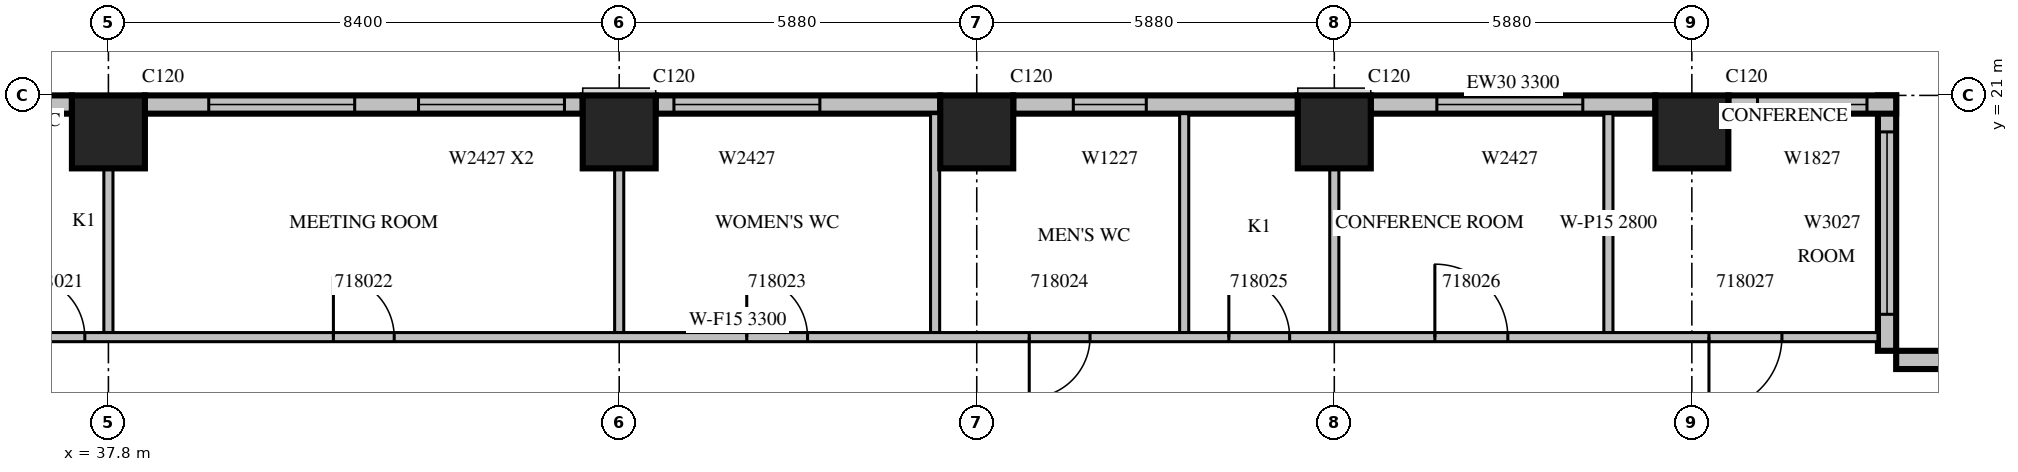
"""IFC4 building model, lengths in metres.
Left out: names, types, materials, properties, quantities, classifications, styles, units other than length and angle.
Written with IfcOpenShell. Run it as: python <this file> out.ifc"""

import sys

from ifc_helpers import new_model, si_unit, direction, frame, frame_2d, origin, origin_2d, place, context, subcontext, project, spatial, rectangle, extrude, source, transform, mapped, element, fill, save


model = new_model("IFC4")
c1 = context("Model", 3, precision=1e-05, world=origin(), true_north=direction((0.0, 1.0)))
c2 = subcontext(c1, "Body", "Model", "MODEL_VIEW")
j1 = project(units=[si_unit("LENGTHUNIT", "METRE"), si_unit("PLANEANGLEUNIT", "RADIAN")], contexts=[c1])
p1 = place(None, origin())
s1 = spatial("IfcSite", under=j1, at=p1, CompositionType="ELEMENT")
p2 = place(p1, origin())
s2 = spatial("IfcBuilding", under=s1, at=p2, CompositionType="ELEMENT")
p3 = place(p2, frame((0.0, 0.0, 86.7)))
s3 = spatial("IfcBuildingStorey", under=s2, at=p3, CompositionType="ELEMENT", Elevation=86.7)
m1 = source(origin(), c2, "Body", "SweptSolid", [
    extrude(rectangle(XDim=1.2, YDim=1.2, at=origin_2d()), origin(), (0.0, 0.0, 1.0), 4.2),
])
for number, where, z_axis, x_axis in (
    (1, (37.8, 20.4, 0.0), (0.0, 0.0, 1.0), (1.0, 0.0, 0.0)),
    (2, (46.2, 20.4, 0.0), (0.0, 0.0, 1.0), (1.0, 0.0, 0.0)),
    (3, (52.08, 20.4, 0.0), (0.0, 0.0, 1.0), (1.0, 0.0, 0.0)),
    (4, (57.96, 20.4, 0.0), (0.0, 0.0, 1.0), (1.0, 0.0, 0.0)),
    (5, (63.84, 20.4, 0.0), (0.0, 0.0, 1.0), (1.0, 0.0, 0.0)),
):
    element("IfcColumn", number, at=place(p3, frame(where, z_axis=z_axis, x_axis=x_axis)), inside=s3, PredefinedType="COLUMN", context=c2, shape_type="MappedRepresentation", body=[
        mapped(m1, transform((0.0, 0.0, 0.0), scale=1.0)),
    ])
m2 = source(origin(), c2, "Body", "SweptSolid", [
    extrude(rectangle(XDim=4.2, YDim=0.3, at=frame_2d((2.1, 0.0))), origin(), (0.0, 0.0, 1.0), 3.8),
])
p4 = place(p3, frame((71.4, 16.65, 0.0), z_axis=(0.0, 0.0, 1.0), x_axis=(-1.0, 0.0, 0.0)))
e6 = element("IfcWall", 6, at=p4, inside=s3, PredefinedType="STANDARD", context=c2, shape_type="MappedRepresentation", body=[
    mapped(m2, transform((0.0, 0.0, 0.0), scale=1.0)),
])
m3 = source(origin(), c2, "Body", "SweptSolid", [
    extrude(rectangle(XDim=1.2, YDim=2.7, at=frame_2d((0.6, 1.35))), frame((0.0, 0.16, 0.0), z_axis=(0.0, -1.0, 0.0), x_axis=(1.0, 0.0, 0.0)), (0.0, 0.0, 1.0), 0.32),
])
p5 = place(p4, frame((0.66, 0.0, 0.6)))
e7 = element("IfcOpeningElement", 7, at=p5, cuts=e6, PredefinedType="OPENING", context=c2, shape_type="MappedRepresentation", body=[
    mapped(m3, transform((0.0, 0.0, 0.0), scale=1.0)),
])
p6 = place(p3, frame((67.05, 16.8, 0.0), z_axis=(0.0, 0.0, 1.0), x_axis=(0.0, 1.0, 0.0)))
e8 = element("IfcWall", 8, at=p6, inside=s3, PredefinedType="STANDARD", context=c2, shape_type="MappedRepresentation", body=[
    mapped(m2, transform((0.0, 0.0, 0.0), scale=1.0)),
])
m4 = source(origin(), c2, "Body", "SweptSolid", [
    extrude(rectangle(XDim=3.0, YDim=2.7, at=frame_2d((1.5, 1.35))), frame((0.0, 0.16, 0.0), z_axis=(0.0, -1.0, 0.0), x_axis=(1.0, 0.0, 0.0)), (0.0, 0.0, 1.0), 0.32),
])
p7 = place(p6, frame((0.6, 0.0, 0.6)))
e9 = element("IfcOpeningElement", 9, at=p7, cuts=e8, PredefinedType="OPENING", context=c2, shape_type="MappedRepresentation", body=[
    mapped(m4, transform((0.0, 0.0, 0.0), scale=1.0)),
])
m5 = source(origin(), c2, "Body", "SweptSolid", [
    extrude(rectangle(XDim=2.76, YDim=0.3, at=frame_2d((1.38, 0.0))), origin(), (0.0, 0.0, 1.0), 3.8),
])
p8 = place(p3, frame((67.2, 20.85, 0.0), z_axis=(0.0, 0.0, 1.0), x_axis=(-1.0, 0.0, 0.0)))
e10 = element("IfcWall", 10, at=p8, inside=s3, PredefinedType="STANDARD", context=c2, shape_type="MappedRepresentation", body=[
    mapped(m5, transform((0.0, 0.0, 0.0), scale=1.0)),
])
m6 = source(origin(), c2, "Body", "SweptSolid", [
    extrude(rectangle(XDim=1.8, YDim=2.7, at=frame_2d((0.9, 1.35))), frame((0.0, 0.16, 0.0), z_axis=(0.0, -1.0, 0.0), x_axis=(1.0, 0.0, 0.0)), (0.0, 0.0, 1.0), 0.32),
])
p9 = place(p8, frame((0.48, 0.0, 0.6)))
e11 = element("IfcOpeningElement", 11, at=p9, cuts=e10, PredefinedType="OPENING", context=c2, shape_type="MappedRepresentation", body=[
    mapped(m6, transform((0.0, 0.0, 0.0), scale=1.0)),
])
m7 = source(origin(), c2, "Body", "SweptSolid", [
    extrude(rectangle(XDim=4.68, YDim=0.3, at=frame_2d((2.34, 0.0))), origin(), (0.0, 0.0, 1.0), 3.3),
])
p10 = place(p3, frame((63.24, 20.85, 0.0), z_axis=(0.0, 0.0, 1.0), x_axis=(-1.0, 0.0, 0.0)))
e12 = element("IfcWall", 12, at=p10, inside=s3, PredefinedType="STANDARD", context=c2, shape_type="MappedRepresentation", body=[
    mapped(m7, transform((0.0, 0.0, 0.0), scale=1.0)),
])
m8 = source(origin(), c2, "Body", "SweptSolid", [
    extrude(rectangle(XDim=2.4, YDim=2.7, at=frame_2d((1.2, 1.35))), frame((0.0, 0.16, 0.0), z_axis=(0.0, -1.0, 0.0), x_axis=(1.0, 0.0, 0.0)), (0.0, 0.0, 1.0), 0.32),
])
p11 = place(p10, frame((1.194, 0.0, 0.6)))
e13 = element("IfcOpeningElement", 13, at=p11, cuts=e12, PredefinedType="OPENING", context=c2, shape_type="MappedRepresentation", body=[
    mapped(m8, transform((0.0, 0.0, 0.0), scale=1.0)),
])
m9 = source(origin(), c2, "Body", "SweptSolid", [
    extrude(rectangle(XDim=4.68, YDim=0.3, at=frame_2d((2.34, 0.0))), origin(), (0.0, 0.0, 1.0), 3.8),
])
p12 = place(p3, frame((57.36, 20.85, 0.0), z_axis=(0.0, 0.0, 1.0), x_axis=(-1.0, 0.0, 0.0)))
e14 = element("IfcWall", 14, at=p12, inside=s3, PredefinedType="STANDARD", context=c2, shape_type="MappedRepresentation", body=[
    mapped(m9, transform((0.0, 0.0, 0.0), scale=1.0)),
])
p13 = place(p12, frame((2.492, 0.0, 0.6)))
e15 = element("IfcOpeningElement", 15, at=p13, cuts=e14, PredefinedType="OPENING", context=c2, shape_type="MappedRepresentation", body=[
    mapped(m3, transform((0.0, 0.0, 0.0), scale=1.0)),
])
p14 = place(p3, frame((51.48, 20.85, 0.0), z_axis=(0.0, 0.0, 1.0), x_axis=(-1.0, 0.0, 0.0)))
e16 = element("IfcWall", 16, at=p14, inside=s3, PredefinedType="STANDARD", context=c2, shape_type="MappedRepresentation", body=[
    mapped(m9, transform((0.0, 0.0, 0.0), scale=1.0)),
])
p15 = place(p14, frame((1.98, 0.0, 0.6)))
e17 = element("IfcOpeningElement", 17, at=p15, cuts=e16, PredefinedType="OPENING", context=c2, shape_type="MappedRepresentation", body=[
    mapped(m8, transform((0.0, 0.0, 0.0), scale=1.0)),
])
m10 = source(origin(), c2, "Body", "SweptSolid", [
    extrude(rectangle(XDim=7.2, YDim=0.3, at=frame_2d((3.6, 0.0))), origin(), (0.0, 0.0, 1.0), 3.8),
])
p16 = place(p3, frame((45.6, 20.85, 0.0), z_axis=(0.0, 0.0, 1.0), x_axis=(-1.0, 0.0, 0.0)))
e18 = element("IfcWall", 18, at=p16, inside=s3, PredefinedType="STANDARD", context=c2, shape_type="MappedRepresentation", body=[
    mapped(m10, transform((0.0, 0.0, 0.0), scale=1.0)),
])
p17 = place(p16, frame((0.3, 0.0, 0.6)))
e19 = element("IfcOpeningElement", 19, at=p17, cuts=e18, PredefinedType="OPENING", context=c2, shape_type="MappedRepresentation", body=[
    mapped(m8, transform((0.0, 0.0, 0.0), scale=1.0)),
])
p18 = place(p16, frame((3.75, 0.0, 0.6)))
e20 = element("IfcOpeningElement", 20, at=p18, cuts=e18, PredefinedType="OPENING", context=c2, shape_type="MappedRepresentation", body=[
    mapped(m8, transform((0.0, 0.0, 0.0), scale=1.0)),
])
m11 = source(origin(), c2, "Body", "SweptSolid", [
    extrude(rectangle(XDim=7.2, YDim=0.3, at=frame_2d((3.6, 0.0))), origin(), (0.0, 0.0, 1.0), 3.3),
])
p19 = place(p3, frame((37.2, 20.85, 0.0), z_axis=(0.0, 0.0, 1.0), x_axis=(-1.0, 0.0, 0.0)))
e21 = element("IfcWall", 21, at=p19, inside=s3, PredefinedType="STANDARD", context=c2, shape_type="MappedRepresentation", body=[
    mapped(m11, transform((0.0, 0.0, 0.0), scale=1.0)),
])
p20 = place(p19, frame((2.466, 0.0, 0.6)))
e22 = element("IfcOpeningElement", 22, at=p20, cuts=e21, PredefinedType="OPENING", context=c2, shape_type="MappedRepresentation", body=[
    mapped(m3, transform((0.0, 0.0, 0.0), scale=1.0)),
])
p21 = place(p19, frame((4.441, 0.0, 0.6)))
e23 = element("IfcOpeningElement", 23, at=p21, cuts=e21, PredefinedType="OPENING", context=c2, shape_type="MappedRepresentation", body=[
    mapped(m3, transform((0.0, 0.0, 0.0), scale=1.0)),
])
m12 = source(origin(), c2, "Body", "SweptSolid", [
    extrude(rectangle(XDim=3.6, YDim=0.15, at=frame_2d((1.8, 0.0))), origin(), (0.0, 0.0, 1.0), 3.8),
])
for number, where, z_axis, x_axis in (
    (24, (51.395, 20.7, 0.0), (0.0, 0.0, 1.0), (0.0, -1.0, 0.0)),
    (25, (55.491, 20.7, 0.0), (0.0, 0.0, 1.0), (0.0, -1.0, 0.0)),
):
    element("IfcWall", number, at=place(p3, frame(where, z_axis=z_axis, x_axis=x_axis)), inside=s3, PredefinedType="PARTITIONING", context=c2, shape_type="MappedRepresentation", body=[
        mapped(m12, transform((0.0, 0.0, 0.0), scale=1.0)),
    ])
m13 = source(origin(), c2, "Body", "SweptSolid", [
    extrude(rectangle(XDim=3.6, YDim=0.15, at=frame_2d((1.8, 0.0))), origin(), (0.0, 0.0, 1.0), 2.8),
])
p22 = place(p3, frame((62.468, 20.7, 0.0), z_axis=(0.0, 0.0, 1.0), x_axis=(0.0, -1.0, 0.0)))
e26 = element("IfcWall", 26, at=p22, inside=s3, PredefinedType="PARTITIONING", context=c2, shape_type="MappedRepresentation", body=[
    mapped(m13, transform((0.0, 0.0, 0.0), scale=1.0)),
])
m14 = source(origin(), c2, "Body", "SweptSolid", [
    extrude(rectangle(XDim=2.701, YDim=0.15, at=frame_2d((1.351, 0.0))), origin(), (0.0, 0.0, 1.0), 3.8),
])
for number, where, z_axis, x_axis in (
    (27, (37.8, 17.1, 0.0), (0.0, 0.0, 1.0), (0.0, 1.0, 0.0)),
    (28, (46.2, 17.1, 0.0), (0.0, 0.0, 1.0), (0.0, 1.0, 0.0)),
    (29, (57.96, 17.1, 0.0), (0.0, 0.0, 1.0), (0.0, 1.0, 0.0)),
):
    element("IfcWall", number, at=place(p3, frame(where, z_axis=z_axis, x_axis=x_axis)), inside=s3, PredefinedType="PARTITIONING", context=c2, shape_type="MappedRepresentation", body=[
        mapped(m14, transform((0.0, 0.0, 0.0), scale=1.0)),
    ])
m15 = source(origin(), c2, "Body", "SweptSolid", [
    extrude(rectangle(XDim=37.5, YDim=0.15, at=frame_2d((18.75, 0.0))), origin(), (0.0, 0.0, 1.0), 3.3),
])
p23 = place(p3, frame((29.4, 17.025, 0.0), z_axis=(0.0, 0.0, 1.0), x_axis=(1.0, 0.0, 0.0)))
e30 = element("IfcWall", 30, at=p23, inside=s3, PredefinedType="PARTITIONING", context=c2, shape_type="MappedRepresentation", body=[
    mapped(m15, transform((0.0, 0.0, 0.0), scale=1.0)),
])
m16 = source(origin(), c2, "Body", "SweptSolid", [
    extrude(rectangle(XDim=1.0, YDim=2.1, at=frame_2d((0.5, 1.05))), frame((0.0, 0.085, 0.0), z_axis=(0.0, -1.0, 0.0), x_axis=(1.0, 0.0, 0.0)), (0.0, 0.0, 1.0), 0.17),
])
p24 = place(p23, frame((1.357, 0.0, 0.0)))
e31 = element("IfcOpeningElement", 31, at=p24, cuts=e30, PredefinedType="OPENING", context=c2, shape_type="MappedRepresentation", body=[
    mapped(m16, transform((0.0, 0.0, 0.0), scale=1.0)),
])
p25 = place(p23, frame((4.669, 0.0, 0.0)))
e32 = element("IfcOpeningElement", 32, at=p25, cuts=e30, PredefinedType="OPENING", context=c2, shape_type="MappedRepresentation", body=[
    mapped(m16, transform((0.0, 0.0, 0.0), scale=1.0)),
])
p26 = place(p23, frame((7.012, 0.0, 0.0)))
e33 = element("IfcOpeningElement", 33, at=p26, cuts=e30, PredefinedType="OPENING", context=c2, shape_type="MappedRepresentation", body=[
    mapped(m16, transform((0.0, 0.0, 0.0), scale=1.0)),
])
p27 = place(p23, frame((12.1, 0.0, 0.0)))
e34 = element("IfcOpeningElement", 34, at=p27, cuts=e30, PredefinedType="OPENING", context=c2, shape_type="MappedRepresentation", body=[
    mapped(m16, transform((0.0, 0.0, 0.0), scale=1.0)),
])
p28 = place(p23, frame((18.898, 0.0, 0.0)))
e35 = element("IfcOpeningElement", 35, at=p28, cuts=e30, PredefinedType="OPENING", context=c2, shape_type="MappedRepresentation", body=[
    mapped(m16, transform((0.0, 0.0, 0.0), scale=1.0)),
])
p29 = place(p23, frame((23.543, 0.0, 0.0)))
e36 = element("IfcOpeningElement", 36, at=p29, cuts=e30, PredefinedType="OPENING", context=c2, shape_type="MappedRepresentation", body=[
    mapped(m16, transform((0.0, 0.0, 0.0), scale=1.0)),
])
p30 = place(p23, frame((26.826, 0.0, 0.0)))
e37 = element("IfcOpeningElement", 37, at=p30, cuts=e30, PredefinedType="OPENING", context=c2, shape_type="MappedRepresentation", body=[
    mapped(m16, transform((0.0, 0.0, 0.0), scale=1.0)),
])
m17 = source(origin(), c2, "Body", "SweptSolid", [
    extrude(rectangle(XDim=1.2, YDim=2.1, at=frame_2d((0.6, 1.05))), frame((0.0, 0.085, 0.0), z_axis=(0.0, -1.0, 0.0), x_axis=(1.0, 0.0, 0.0)), (0.0, 0.0, 1.0), 0.17),
])
p31 = place(p23, frame((30.214, 0.0, 0.0)))
e38 = element("IfcOpeningElement", 38, at=p31, cuts=e30, PredefinedType="OPENING", context=c2, shape_type="MappedRepresentation", body=[
    mapped(m17, transform((0.0, 0.0, 0.0), scale=1.0)),
])
p32 = place(p23, frame((34.721, 0.0, 0.0)))
e39 = element("IfcOpeningElement", 39, at=p32, cuts=e30, PredefinedType="OPENING", context=c2, shape_type="MappedRepresentation", body=[
    mapped(m17, transform((0.0, 0.0, 0.0), scale=1.0)),
])
m18 = source(origin(), c2, "Body", "SweptSolid", [
    extrude(rectangle(XDim=3.0, YDim=2.7, at=frame_2d((1.5, 1.35))), frame((0.0, 0.03, 0.0), z_axis=(0.0, -1.0, 0.0), x_axis=(1.0, 0.0, 0.0)), (0.0, 0.0, 1.0), 0.06),
])
p33 = place(p7, origin())
e40 = element("IfcWindow", 40, at=p33, inside=s3, PartitioningType="SINGLE_PANEL", PredefinedType="WINDOW", context=c2, shape_type="MappedRepresentation", body=[
    mapped(m18, transform((0.0, 0.0, 0.0), scale=1.0)),
])
fill(e9, e40)
m19 = source(origin(), c2, "Body", "SweptSolid", [
    extrude(rectangle(XDim=2.4, YDim=2.7, at=frame_2d((1.2, 1.35))), frame((0.0, 0.03, 0.0), z_axis=(0.0, -1.0, 0.0), x_axis=(1.0, 0.0, 0.0)), (0.0, 0.0, 1.0), 0.06),
])
p34 = place(p11, origin())
e41 = element("IfcWindow", 41, at=p34, inside=s3, PartitioningType="SINGLE_PANEL", PredefinedType="WINDOW", context=c2, shape_type="MappedRepresentation", body=[
    mapped(m19, transform((0.0, 0.0, 0.0), scale=1.0)),
])
fill(e13, e41)
p35 = place(p15, origin())
e42 = element("IfcWindow", 42, at=p35, inside=s3, PartitioningType="SINGLE_PANEL", PredefinedType="WINDOW", context=c2, shape_type="MappedRepresentation", body=[
    mapped(m19, transform((0.0, 0.0, 0.0), scale=1.0)),
])
fill(e17, e42)
m20 = source(origin(), c2, "Body", "SweptSolid", [
    extrude(rectangle(XDim=1.8, YDim=2.7, at=frame_2d((0.9, 1.35))), frame((0.0, 0.03, 0.0), z_axis=(0.0, -1.0, 0.0), x_axis=(1.0, 0.0, 0.0)), (0.0, 0.0, 1.0), 0.06),
])
p36 = place(p9, origin())
e43 = element("IfcWindow", 43, at=p36, inside=s3, PartitioningType="SINGLE_PANEL", PredefinedType="WINDOW", context=c2, shape_type="MappedRepresentation", body=[
    mapped(m20, transform((0.0, 0.0, 0.0), scale=1.0)),
])
fill(e11, e43)
m21 = source(origin(), c2, "Body", "SweptSolid", [
    extrude(rectangle(XDim=1.2, YDim=2.7, at=frame_2d((0.6, 1.35))), frame((0.0, 0.03, 0.0), z_axis=(0.0, -1.0, 0.0), x_axis=(1.0, 0.0, 0.0)), (0.0, 0.0, 1.0), 0.06),
])
p37 = place(p13, origin())
e44 = element("IfcWindow", 44, at=p37, inside=s3, PartitioningType="SINGLE_PANEL", PredefinedType="WINDOW", context=c2, shape_type="MappedRepresentation", body=[
    mapped(m21, transform((0.0, 0.0, 0.0), scale=1.0)),
])
fill(e15, e44)
p38 = place(p17, origin())
e45 = element("IfcWindow", 45, at=p38, inside=s3, PartitioningType="SINGLE_PANEL", PredefinedType="WINDOW", context=c2, shape_type="MappedRepresentation", body=[
    mapped(m19, transform((0.0, 0.0, 0.0), scale=1.0)),
])
fill(e19, e45)
p39 = place(p18, origin())
e46 = element("IfcWindow", 46, at=p39, inside=s3, PartitioningType="SINGLE_PANEL", PredefinedType="WINDOW", context=c2, shape_type="MappedRepresentation", body=[
    mapped(m19, transform((0.0, 0.0, 0.0), scale=1.0)),
])
fill(e20, e46)
m22 = source(origin(), c2, "Body", "SweptSolid", [
    extrude(rectangle(XDim=1.0, YDim=2.1, at=frame_2d((0.5, 1.05))), frame((0.0, 0.025, 0.0), z_axis=(0.0, -1.0, 0.0), x_axis=(1.0, 0.0, 0.0)), (0.0, 0.0, 1.0), 0.05),
])
p40 = place(p26, origin())
e47 = element("IfcDoor", 47, at=p40, inside=s3, OperationType="SINGLE_SWING_LEFT", PredefinedType="DOOR", context=c2, shape_type="MappedRepresentation", body=[
    mapped(m22, transform((0.0, 0.0, 0.0), scale=1.0)),
])
fill(e33, e47)
p41 = place(p27, origin())
e48 = element("IfcDoor", 48, at=p41, inside=s3, OperationType="SINGLE_SWING_LEFT", PredefinedType="DOOR", context=c2, shape_type="MappedRepresentation", body=[
    mapped(m22, transform((0.0, 0.0, 0.0), scale=1.0)),
])
fill(e34, e48)
p42 = place(p28, origin())
e49 = element("IfcDoor", 49, at=p42, inside=s3, OperationType="SINGLE_SWING_LEFT", PredefinedType="DOOR", context=c2, shape_type="MappedRepresentation", body=[
    mapped(m22, transform((0.0, 0.0, 0.0), scale=1.0)),
])
fill(e35, e49)
p43 = place(p29, origin())
e50 = element("IfcDoor", 50, at=p43, inside=s3, OperationType="SINGLE_SWING_RIGHT", PredefinedType="DOOR", context=c2, shape_type="MappedRepresentation", body=[
    mapped(m22, transform((0.0, 0.0, 0.0), scale=1.0)),
])
fill(e36, e50)
p44 = place(p30, origin())
e51 = element("IfcDoor", 51, at=p44, inside=s3, OperationType="SINGLE_SWING_LEFT", PredefinedType="DOOR", context=c2, shape_type="MappedRepresentation", body=[
    mapped(m22, transform((0.0, 0.0, 0.0), scale=1.0)),
])
fill(e37, e51)
m23 = source(origin(), c2, "Body", "SweptSolid", [
    extrude(rectangle(XDim=1.2, YDim=2.1, at=frame_2d((0.6, 1.05))), frame((0.0, 0.025, 0.0), z_axis=(0.0, -1.0, 0.0), x_axis=(1.0, 0.0, 0.0)), (0.0, 0.0, 1.0), 0.05),
])
p45 = place(p31, origin())
e52 = element("IfcDoor", 52, at=p45, inside=s3, OperationType="SINGLE_SWING_LEFT", PredefinedType="DOOR", context=c2, shape_type="MappedRepresentation", body=[
    mapped(m23, transform((0.0, 0.0, 0.0), scale=1.0)),
])
fill(e38, e52)
p46 = place(p32, origin())
e53 = element("IfcDoor", 53, at=p46, inside=s3, OperationType="SINGLE_SWING_RIGHT", PredefinedType="DOOR", context=c2, shape_type="MappedRepresentation", body=[
    mapped(m23, transform((0.0, 0.0, 0.0), scale=1.0)),
])
fill(e39, e53)
save(model, sys.argv[1])
